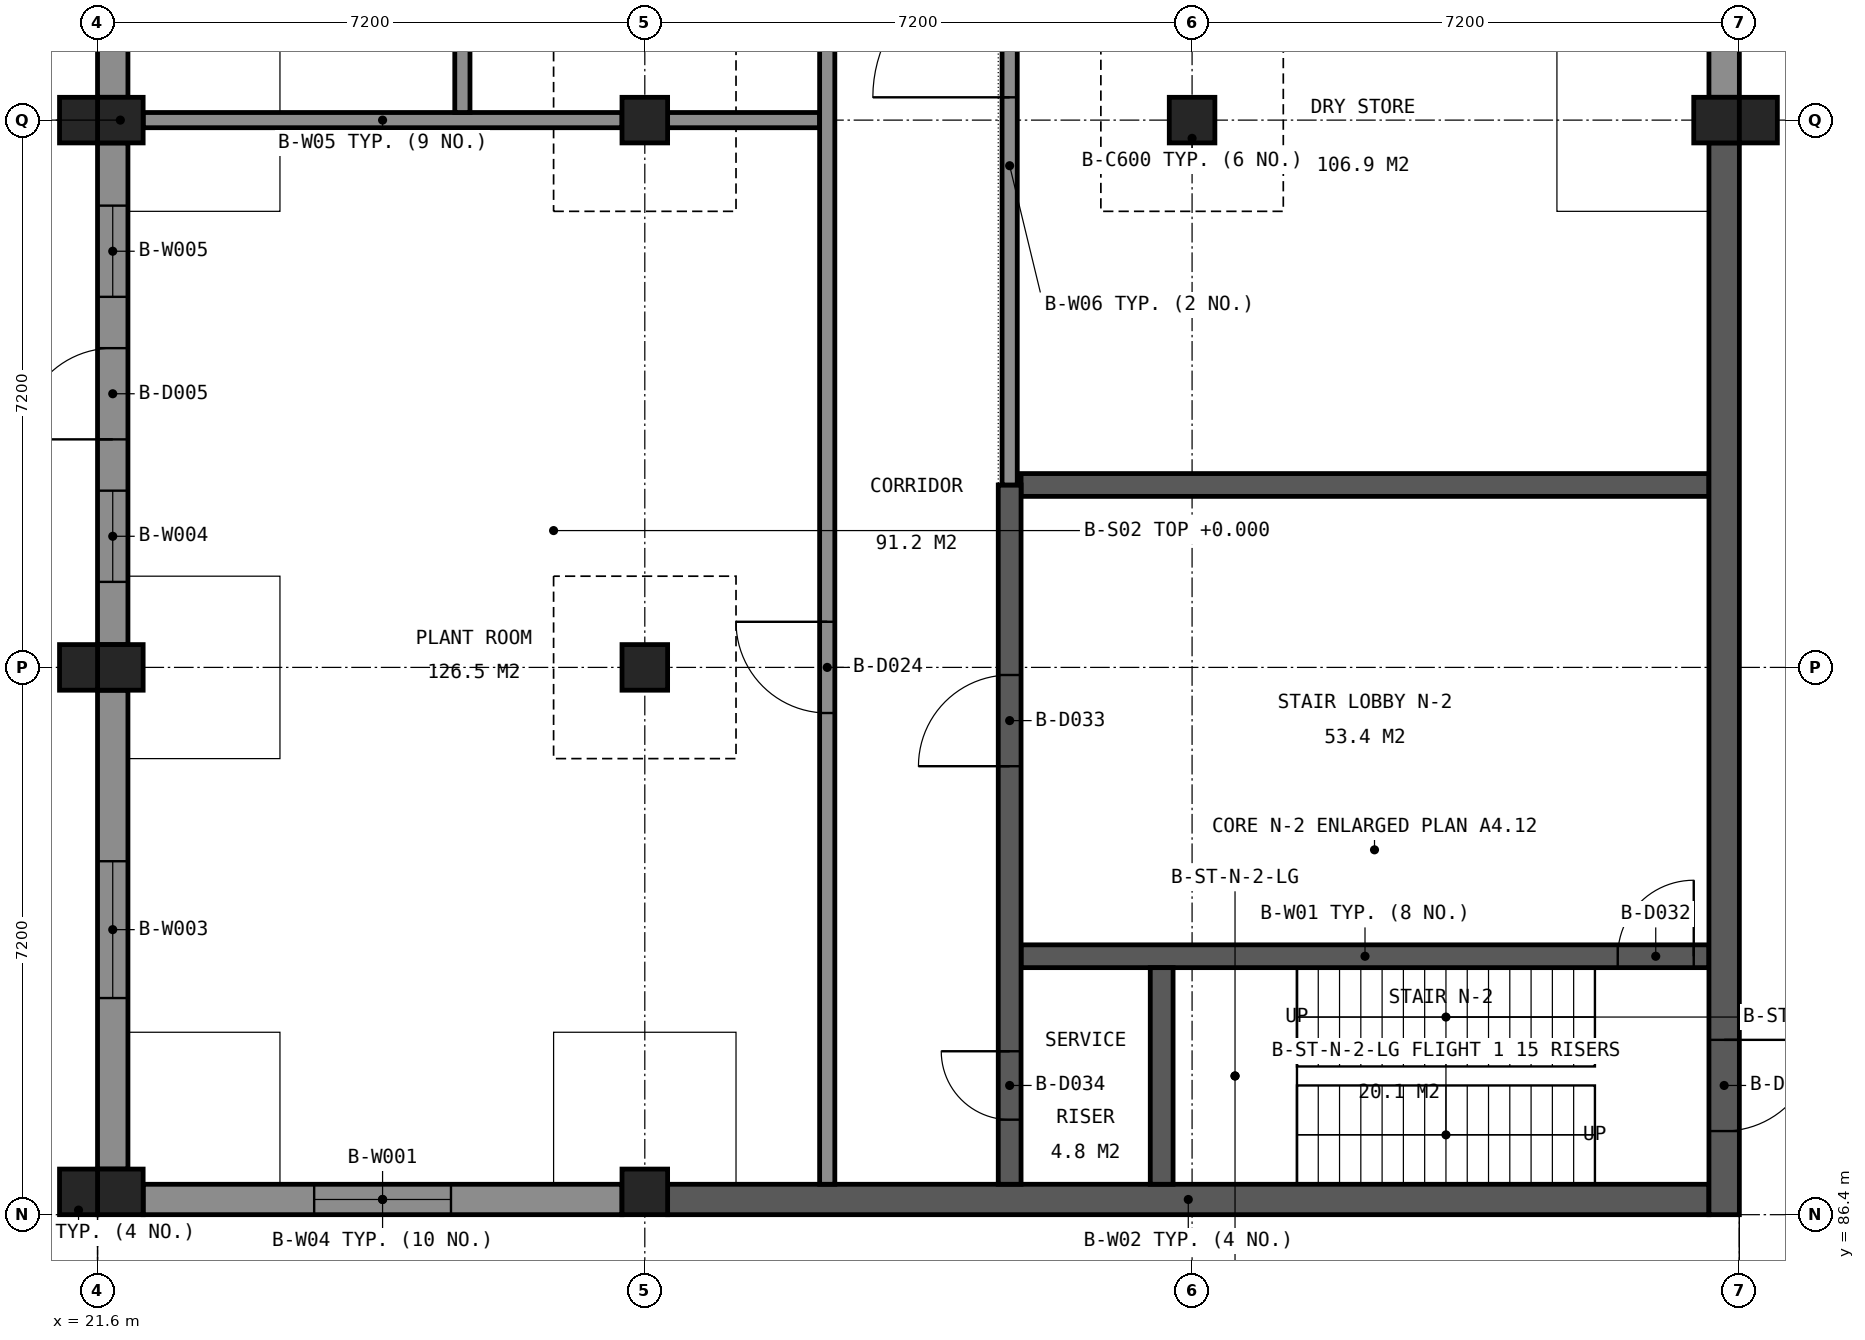
"""IFC4 building model, lengths in metres.
Left out: names, types, materials, properties, quantities, classifications, styles, units other than length and angle.
Written with IfcOpenShell. Run it as: python <this file> out.ifc"""

import sys

from ifc_helpers import new_model, si_unit, direction, frame, frame_2d, origin, origin_2d, place, context, subcontext, project, spatial, rectangle, extrude, element, fill, save


model = new_model("IFC4")
c1 = context("Model", 3, precision=1e-05, world=origin(), true_north=direction((0.0, 1.0)))
c2 = subcontext(c1, "Body", "Model", "MODEL_VIEW")
j1 = project(units=[si_unit("LENGTHUNIT", "METRE"), si_unit("PLANEANGLEUNIT", "RADIAN")], contexts=[c1])
p1 = place(None, origin())
s1 = spatial("IfcSite", under=j1, at=p1, CompositionType="ELEMENT")
p2 = place(p1, origin())
s2 = spatial("IfcBuilding", under=s1, at=p2, CompositionType="ELEMENT")
p3 = place(p2, origin())
s3 = spatial("IfcBuildingStorey", under=s2, at=p3, CompositionType="ELEMENT", Elevation=0.0)
for number, where, z_axis, x_axis in (
    (1, (21.9, 100.8, 0.0), (0.0, 0.0, 1.0), (1.0, 0.0, 0.0)),
    (2, (21.9, 93.6, 0.0), (0.0, 0.0, 1.0), (1.0, 0.0, 0.0)),
    (3, (21.9, 86.7, 0.0), (0.0, 0.0, 1.0), (1.0, 0.0, 0.0)),
    (4, (28.8, 100.8, 0.0), (0.0, 0.0, 1.0), (1.0, 0.0, 0.0)),
    (5, (28.8, 93.6, 0.0), (0.0, 0.0, 1.0), (1.0, 0.0, 0.0)),
    (6, (28.8, 86.7, 0.0), (0.0, 0.0, 1.0), (1.0, 0.0, 0.0)),
    (7, (36.0, 100.8, 0.0), (0.0, 0.0, 1.0), (1.0, 0.0, 0.0)),
    (8, (42.9, 100.8, 0.0), (0.0, 0.0, 1.0), (1.0, 0.0, 0.0)),
):
    element("IfcColumn", number, at=place(p3, frame(where, z_axis=z_axis, x_axis=x_axis)), inside=s3, PredefinedType="COLUMN", context=c2, shape_type="SweptSolid", body=[
        extrude(rectangle(XDim=0.6, YDim=0.6, at=origin_2d()), origin(), (0.0, 0.0, 1.0), 4.8),
    ])
p4 = place(p3, frame((29.1, 86.6, 0.0), z_axis=(0.0, 0.0, 1.0), x_axis=(1.0, 0.0, 0.0)))
e9 = element("IfcWall", 9, at=p4, inside=s3, PredefinedType="SHEAR", context=c2, shape_type="SweptSolid", body=[
    extrude(rectangle(XDim=13.7, YDim=0.4, at=frame_2d((6.85, 0.0))), origin(), (0.0, 0.0, 1.0), 4.55),
])
p5 = place(p3, frame((33.75, 89.8, 0.0), z_axis=(0.0, 0.0, 1.0), x_axis=(1.0, 0.0, 0.0)))
e10 = element("IfcWall", 10, at=p5, inside=s3, PredefinedType="SHEAR", context=c2, shape_type="SweptSolid", body=[
    extrude(rectangle(XDim=9.05, YDim=0.3, at=frame_2d((4.525, 0.0))), origin(), (0.0, 0.0, 1.0), 4.55),
])
p6 = place(p5, frame((7.85, 0.0, 0.0)))
e11 = element("IfcOpeningElement", 11, at=p6, cuts=e10, PredefinedType="OPENING", context=c2, shape_type="SweptSolid", body=[
    extrude(rectangle(XDim=1.0, YDim=2.1, at=frame_2d((0.5, 1.05))), frame((0.0, 0.16, 0.0), z_axis=(0.0, -1.0, 0.0), x_axis=(1.0, 0.0, 0.0)), (0.0, 0.0, 1.0), 0.32),
])
p7 = place(p3, frame((33.75, 96.0, 0.0), z_axis=(0.0, 0.0, 1.0), x_axis=(1.0, 0.0, 0.0)))
e12 = element("IfcWall", 12, at=p7, inside=s3, PredefinedType="SHEAR", context=c2, shape_type="SweptSolid", body=[
    extrude(rectangle(XDim=9.05, YDim=0.3, at=frame_2d((4.525, 0.0))), origin(), (0.0, 0.0, 1.0), 4.55),
])
p8 = place(p3, frame((33.6, 86.8, 0.0), z_axis=(0.0, 0.0, 1.0), x_axis=(0.0, 1.0, 0.0)))
e13 = element("IfcWall", 13, at=p8, inside=s3, PredefinedType="SHEAR", context=c2, shape_type="SweptSolid", body=[
    extrude(rectangle(XDim=9.2, YDim=0.3, at=frame_2d((4.6, 0.0))), origin(), (0.0, 0.0, 1.0), 4.55),
])
p9 = place(p8, frame((5.5, 0.0, 0.0)))
e14 = element("IfcOpeningElement", 14, at=p9, cuts=e13, PredefinedType="OPENING", context=c2, shape_type="SweptSolid", body=[
    extrude(rectangle(XDim=1.2, YDim=2.1, at=frame_2d((0.6, 1.05))), frame((0.0, 0.16, 0.0), z_axis=(0.0, -1.0, 0.0), x_axis=(1.0, 0.0, 0.0)), (0.0, 0.0, 1.0), 0.32),
])
p10 = place(p8, frame((0.85, 0.0, 0.0)))
e15 = element("IfcOpeningElement", 15, at=p10, cuts=e13, PredefinedType="OPENING", context=c2, shape_type="SweptSolid", body=[
    extrude(rectangle(XDim=0.9, YDim=2.1, at=frame_2d((0.45, 1.05))), frame((0.0, 0.16, 0.0), z_axis=(0.0, -1.0, 0.0), x_axis=(1.0, 0.0, 0.0)), (0.0, 0.0, 1.0), 0.32),
])
p11 = place(p3, frame((35.6, 86.8, 0.0), z_axis=(0.0, 0.0, 1.0), x_axis=(0.0, 1.0, 0.0)))
e16 = element("IfcWall", 16, at=p11, inside=s3, PredefinedType="SHEAR", context=c2, shape_type="SweptSolid", body=[
    extrude(rectangle(XDim=2.85, YDim=0.3, at=frame_2d((1.425, 0.0))), origin(), (0.0, 0.0, 1.0), 4.55),
])
p12 = place(p3, frame((43.0, 86.4, 0.0), z_axis=(0.0, 0.0, 1.0), x_axis=(0.0, 1.0, 0.0)))
e17 = element("IfcWall", 17, at=p12, inside=s3, PredefinedType="SHEAR", context=c2, shape_type="SweptSolid", body=[
    extrude(rectangle(XDim=14.1, YDim=0.4, at=frame_2d((7.05, 0.0))), origin(), (0.0, 0.0, 1.0), 4.55),
])
p13 = place(p12, frame((2.3, 0.0, 0.0), z_axis=(0.0, 0.0, 1.0), x_axis=(-1.0, 0.0, 0.0)))
e18 = element("IfcOpeningElement", 18, at=p13, cuts=e17, PredefinedType="OPENING", context=c2, shape_type="SweptSolid", body=[
    extrude(rectangle(XDim=1.2, YDim=2.1, at=frame_2d((0.6, 1.05))), frame((0.0, 0.21, 0.0), z_axis=(0.0, -1.0, 0.0), x_axis=(1.0, 0.0, 0.0)), (0.0, 0.0, 1.0), 0.42),
])
p14 = place(p3, frame((22.2, 86.6, 0.0), z_axis=(0.0, 0.0, 1.0), x_axis=(1.0, 0.0, 0.0)))
e19 = element("IfcWall", 19, at=p14, inside=s3, PredefinedType="SOLIDWALL", context=c2, shape_type="SweptSolid", body=[
    extrude(rectangle(XDim=6.3, YDim=0.4, at=frame_2d((3.15, 0.0))), origin(), (0.0, 0.0, 1.0), 3.95),
])
p15 = place(p14, frame((2.25, 0.0, 2.0)))
e20 = element("IfcOpeningElement", 20, at=p15, cuts=e19, PredefinedType="OPENING", context=c2, shape_type="SweptSolid", body=[
    extrude(rectangle(XDim=1.8, YDim=1.5, at=frame_2d((0.9, 0.75))), frame((0.0, 0.21, 0.0), z_axis=(0.0, -1.0, 0.0), x_axis=(1.0, 0.0, 0.0)), (0.0, 0.0, 1.0), 0.42),
])
p16 = place(p3, frame((21.8, 87.0, 0.0), z_axis=(0.0, 0.0, 1.0), x_axis=(0.0, 1.0, 0.0)))
e21 = element("IfcWall", 21, at=p16, inside=s3, PredefinedType="SOLIDWALL", context=c2, shape_type="SweptSolid", body=[
    extrude(rectangle(XDim=6.3, YDim=0.4, at=frame_2d((3.15, 0.0))), origin(), (0.0, 0.0, 1.0), 3.95),
])
p17 = place(p16, frame((2.25, 0.0, 2.0)))
e22 = element("IfcOpeningElement", 22, at=p17, cuts=e21, PredefinedType="OPENING", context=c2, shape_type="SweptSolid", body=[
    extrude(rectangle(XDim=1.8, YDim=1.5, at=frame_2d((0.9, 0.75))), frame((0.0, 0.21, 0.0), z_axis=(0.0, -1.0, 0.0), x_axis=(1.0, 0.0, 0.0)), (0.0, 0.0, 1.0), 0.42),
])
p18 = place(p3, frame((21.8, 93.9, 0.0), z_axis=(0.0, 0.0, 1.0), x_axis=(0.0, 1.0, 0.0)))
e23 = element("IfcWall", 23, at=p18, inside=s3, PredefinedType="SOLIDWALL", context=c2, shape_type="SweptSolid", body=[
    extrude(rectangle(XDim=6.6, YDim=0.4, at=frame_2d((3.3, 0.0))), origin(), (0.0, 0.0, 1.0), 3.95),
])
p19 = place(p18, frame((2.7, 0.0, 0.0)))
e24 = element("IfcOpeningElement", 24, at=p19, cuts=e23, PredefinedType="OPENING", context=c2, shape_type="SweptSolid", body=[
    extrude(rectangle(XDim=1.2, YDim=2.1, at=frame_2d((0.6, 1.05))), frame((0.0, 0.21, 0.0), z_axis=(0.0, -1.0, 0.0), x_axis=(1.0, 0.0, 0.0)), (0.0, 0.0, 1.0), 0.42),
])
p20 = place(p18, frame((0.825, 0.0, 2.0)))
e25 = element("IfcOpeningElement", 25, at=p20, cuts=e23, PredefinedType="OPENING", context=c2, shape_type="SweptSolid", body=[
    extrude(rectangle(XDim=1.2, YDim=1.5, at=frame_2d((0.6, 0.75))), frame((0.0, 0.21, 0.0), z_axis=(0.0, -1.0, 0.0), x_axis=(1.0, 0.0, 0.0)), (0.0, 0.0, 1.0), 0.42),
])
p21 = place(p18, frame((4.575, 0.0, 2.0)))
e26 = element("IfcOpeningElement", 26, at=p21, cuts=e23, PredefinedType="OPENING", context=c2, shape_type="SweptSolid", body=[
    extrude(rectangle(XDim=1.2, YDim=1.5, at=frame_2d((0.6, 0.75))), frame((0.0, 0.21, 0.0), z_axis=(0.0, -1.0, 0.0), x_axis=(1.0, 0.0, 0.0)), (0.0, 0.0, 1.0), 0.42),
])
p22 = place(p3, frame((21.8, 101.1, 0.0), z_axis=(0.0, 0.0, 1.0), x_axis=(0.0, 1.0, 0.0)))
e27 = element("IfcWall", 27, at=p22, inside=s3, PredefinedType="SOLIDWALL", context=c2, shape_type="SweptSolid", body=[
    extrude(rectangle(XDim=6.6, YDim=0.4, at=frame_2d((3.3, 0.0))), origin(), (0.0, 0.0, 1.0), 3.95),
])
p23 = place(p22, frame((1.8, 0.0, 0.0)))
e28 = element("IfcOpeningElement", 28, at=p23, cuts=e27, PredefinedType="OPENING", context=c2, shape_type="SweptSolid", body=[
    extrude(rectangle(XDim=3.0, YDim=3.0, at=frame_2d((1.5, 1.5))), frame((0.0, 0.21, 0.0), z_axis=(0.0, -1.0, 0.0), x_axis=(1.0, 0.0, 0.0)), (0.0, 0.0, 1.0), 0.42),
])
p24 = place(p3, frame((43.0, 101.1, 0.0), z_axis=(0.0, 0.0, 1.0), x_axis=(0.0, 1.0, 0.0)))
e29 = element("IfcWall", 29, at=p24, inside=s3, PredefinedType="SOLIDWALL", context=c2, shape_type="SweptSolid", body=[
    extrude(rectangle(XDim=6.6, YDim=0.4, at=frame_2d((3.3, 0.0))), origin(), (0.0, 0.0, 1.0), 3.95),
])
p25 = place(p24, frame((2.4, 0.0, 2.0)))
e30 = element("IfcOpeningElement", 30, at=p25, cuts=e29, PredefinedType="OPENING", context=c2, shape_type="SweptSolid", body=[
    extrude(rectangle(XDim=1.8, YDim=1.5, at=frame_2d((0.9, 0.75))), frame((0.0, 0.21, 0.0), z_axis=(0.0, -1.0, 0.0), x_axis=(1.0, 0.0, 0.0)), (0.0, 0.0, 1.0), 0.42),
])
for number, where, z_axis, x_axis in (
    (31, (21.35, 86.7, -0.25), (0.0, 0.0, 1.0), (1.0, 0.0, 0.0)),
    (32, (21.35, 93.6, -0.25), (0.0, 0.0, 1.0), (1.0, 0.0, 0.0)),
    (33, (21.35, 100.8, -0.25), (0.0, 0.0, 1.0), (1.0, 0.0, 0.0)),
    (34, (43.45, 100.8, -0.25), (0.0, 0.0, 1.0), (1.0, 0.0, 0.0)),
):
    element("IfcColumn", number, at=place(p3, frame(where, z_axis=z_axis, x_axis=x_axis)), inside=s3, PredefinedType="COLUMN", context=c2, shape_type="SweptSolid", body=[
        extrude(rectangle(XDim=0.5, YDim=0.6, at=origin_2d()), origin(), (0.0, 0.0, 1.0), 5.05),
    ])
p26 = place(p3, frame((22.2, 100.8, 0.0), z_axis=(0.0, 0.0, 1.0), x_axis=(1.0, 0.0, 0.0)))
e35 = element("IfcWall", 35, at=p26, inside=s3, PredefinedType="PARTITIONING", context=c2, shape_type="SweptSolid", body=[
    extrude(rectangle(XDim=6.3, YDim=0.2, at=frame_2d((3.15, 0.0))), origin(), (0.0, 0.0, 1.0), 3.95),
])
p27 = place(p3, frame((29.1, 100.8, 0.0), z_axis=(0.0, 0.0, 1.0), x_axis=(1.0, 0.0, 0.0)))
e36 = element("IfcWall", 36, at=p27, inside=s3, PredefinedType="PARTITIONING", context=c2, shape_type="SweptSolid", body=[
    extrude(rectangle(XDim=2.0, YDim=0.2, at=frame_2d((1.0, 0.0))), origin(), (0.0, 0.0, 1.0), 3.95),
])
p28 = place(p3, frame((26.4, 100.9, 0.0), z_axis=(0.0, 0.0, 1.0), x_axis=(0.0, 1.0, 0.0)))
e37 = element("IfcWall", 37, at=p28, inside=s3, PredefinedType="PARTITIONING", context=c2, shape_type="SweptSolid", body=[
    extrude(rectangle(XDim=21.4, YDim=0.2, at=frame_2d((10.7, 0.0))), origin(), (0.0, 0.0, 1.0), 3.95),
])
p29 = place(p28, frame((17.3, 0.0, 0.0)))
e38 = element("IfcOpeningElement", 38, at=p29, cuts=e37, PredefinedType="OPENING", context=c2, shape_type="SweptSolid", body=[
    extrude(rectangle(XDim=1.2, YDim=2.1, at=frame_2d((0.6, 1.05))), frame((0.0, 0.11, 0.0), z_axis=(0.0, -1.0, 0.0), x_axis=(1.0, 0.0, 0.0)), (0.0, 0.0, 1.0), 0.22),
])
p30 = place(p28, frame((10.1, 0.0, 0.0)))
e39 = element("IfcOpeningElement", 39, at=p30, cuts=e37, PredefinedType="OPENING", context=c2, shape_type="SweptSolid", body=[
    extrude(rectangle(XDim=1.2, YDim=2.1, at=frame_2d((0.6, 1.05))), frame((0.0, 0.11, 0.0), z_axis=(0.0, -1.0, 0.0), x_axis=(1.0, 0.0, 0.0)), (0.0, 0.0, 1.0), 0.22),
])
p31 = place(p28, frame((2.9, 0.0, 0.0)))
e40 = element("IfcOpeningElement", 40, at=p31, cuts=e37, PredefinedType="OPENING", context=c2, shape_type="SweptSolid", body=[
    extrude(rectangle(XDim=1.2, YDim=2.1, at=frame_2d((0.6, 1.05))), frame((0.0, 0.11, 0.0), z_axis=(0.0, -1.0, 0.0), x_axis=(1.0, 0.0, 0.0)), (0.0, 0.0, 1.0), 0.22),
])
p32 = place(p3, frame((31.2, 86.8, 0.0), z_axis=(0.0, 0.0, 1.0), x_axis=(0.0, 1.0, 0.0)))
e41 = element("IfcWall", 41, at=p32, inside=s3, PredefinedType="PARTITIONING", context=c2, shape_type="SweptSolid", body=[
    extrude(rectangle(XDim=42.4, YDim=0.2, at=frame_2d((21.2, 0.0))), origin(), (0.0, 0.0, 1.0), 3.95),
])
p33 = place(p32, frame((38.7, 0.0, 0.0)))
e42 = element("IfcOpeningElement", 42, at=p33, cuts=e41, PredefinedType="OPENING", context=c2, shape_type="SweptSolid", body=[
    extrude(rectangle(XDim=1.0, YDim=2.1, at=frame_2d((0.5, 1.05))), frame((0.0, 0.11, 0.0), z_axis=(0.0, -1.0, 0.0), x_axis=(1.0, 0.0, 0.0)), (0.0, 0.0, 1.0), 0.22),
])
p34 = place(p32, frame((23.9, 0.0, 0.0)))
e43 = element("IfcOpeningElement", 43, at=p34, cuts=e41, PredefinedType="OPENING", context=c2, shape_type="SweptSolid", body=[
    extrude(rectangle(XDim=1.8, YDim=2.1, at=frame_2d((0.9, 1.05))), frame((0.0, 0.11, 0.0), z_axis=(0.0, -1.0, 0.0), x_axis=(1.0, 0.0, 0.0)), (0.0, 0.0, 1.0), 0.22),
])
p35 = place(p32, frame((6.2, 0.0, 0.0)))
e44 = element("IfcOpeningElement", 44, at=p35, cuts=e41, PredefinedType="OPENING", context=c2, shape_type="SweptSolid", body=[
    extrude(rectangle(XDim=1.2, YDim=2.1, at=frame_2d((0.6, 1.05))), frame((0.0, 0.11, 0.0), z_axis=(0.0, -1.0, 0.0), x_axis=(1.0, 0.0, 0.0)), (0.0, 0.0, 1.0), 0.22),
])
p36 = place(p3, frame((33.6, 96.0, 0.0), z_axis=(0.0, 0.0, 1.0), x_axis=(0.0, 1.0, 0.0)))
e45 = element("IfcWall", 45, at=p36, inside=s3, PredefinedType="PARTITIONING", context=c2, shape_type="SweptSolid", body=[
    extrude(rectangle(XDim=24.0, YDim=0.2, at=frame_2d((12.0, 0.0))), origin(), (0.0, 0.0, 1.0), 3.95),
])
p37 = place(p36, frame((17.1, 0.0, 0.0)))
e46 = element("IfcOpeningElement", 46, at=p37, cuts=e45, PredefinedType="OPENING", context=c2, shape_type="SweptSolid", body=[
    extrude(rectangle(XDim=1.8, YDim=2.1, at=frame_2d((0.9, 1.05))), frame((0.0, 0.11, 0.0), z_axis=(0.0, -1.0, 0.0), x_axis=(1.0, 0.0, 0.0)), (0.0, 0.0, 1.0), 0.22),
])
p38 = place(p36, frame((5.1, 0.0, 0.0)))
e47 = element("IfcOpeningElement", 47, at=p38, cuts=e45, PredefinedType="OPENING", context=c2, shape_type="SweptSolid", body=[
    extrude(rectangle(XDim=1.8, YDim=2.1, at=frame_2d((0.9, 1.05))), frame((0.0, 0.11, 0.0), z_axis=(0.0, -1.0, 0.0), x_axis=(1.0, 0.0, 0.0)), (0.0, 0.0, 1.0), 0.22),
])
p39 = place(p19, origin())
e48 = element("IfcDoor", 48, at=p39, inside=s3, OperationType="SINGLE_SWING_LEFT", PredefinedType="DOOR", context=c2, shape_type="SweptSolid", body=[
    extrude(rectangle(XDim=1.2, YDim=2.1, at=frame_2d((0.6, 1.05))), frame((0.0, 0.025, 0.0), z_axis=(0.0, -1.0, 0.0), x_axis=(1.0, 0.0, 0.0)), (0.0, 0.0, 1.0), 0.05),
])
fill(e24, e48)
p40 = place(p13, origin())
e49 = element("IfcDoor", 49, at=p40, inside=s3, OperationType="SINGLE_SWING_LEFT", PredefinedType="DOOR", context=c2, shape_type="SweptSolid", body=[
    extrude(rectangle(XDim=1.2, YDim=2.1, at=frame_2d((0.6, 1.05))), frame((0.0, 0.025, 0.0), z_axis=(0.0, -1.0, 0.0), x_axis=(1.0, 0.0, 0.0)), (0.0, 0.0, 1.0), 0.05),
])
fill(e18, e49)
p41 = place(p15, origin())
e50 = element("IfcWindow", 50, at=p41, inside=s3, PartitioningType="SINGLE_PANEL", PredefinedType="WINDOW", context=c2, shape_type="SweptSolid", body=[
    extrude(rectangle(XDim=1.8, YDim=1.5, at=frame_2d((0.9, 0.75))), frame((0.0, 0.03, 0.0), z_axis=(0.0, -1.0, 0.0), x_axis=(1.0, 0.0, 0.0)), (0.0, 0.0, 1.0), 0.06),
])
fill(e20, e50)
p42 = place(p17, origin())
e51 = element("IfcWindow", 51, at=p42, inside=s3, PartitioningType="SINGLE_PANEL", PredefinedType="WINDOW", context=c2, shape_type="SweptSolid", body=[
    extrude(rectangle(XDim=1.8, YDim=1.5, at=frame_2d((0.9, 0.75))), frame((0.0, 0.03, 0.0), z_axis=(0.0, -1.0, 0.0), x_axis=(1.0, 0.0, 0.0)), (0.0, 0.0, 1.0), 0.06),
])
fill(e22, e51)
p43 = place(p20, origin())
e52 = element("IfcWindow", 52, at=p43, inside=s3, PartitioningType="SINGLE_PANEL", PredefinedType="WINDOW", context=c2, shape_type="SweptSolid", body=[
    extrude(rectangle(XDim=1.2, YDim=1.5, at=frame_2d((0.6, 0.75))), frame((0.0, 0.03, 0.0), z_axis=(0.0, -1.0, 0.0), x_axis=(1.0, 0.0, 0.0)), (0.0, 0.0, 1.0), 0.06),
])
fill(e25, e52)
p44 = place(p21, origin())
e53 = element("IfcWindow", 53, at=p44, inside=s3, PartitioningType="SINGLE_PANEL", PredefinedType="WINDOW", context=c2, shape_type="SweptSolid", body=[
    extrude(rectangle(XDim=1.2, YDim=1.5, at=frame_2d((0.6, 0.75))), frame((0.0, 0.03, 0.0), z_axis=(0.0, -1.0, 0.0), x_axis=(1.0, 0.0, 0.0)), (0.0, 0.0, 1.0), 0.06),
])
fill(e26, e53)
p45 = place(p35, origin())
e54 = element("IfcDoor", 54, at=p45, inside=s3, OperationType="SINGLE_SWING_RIGHT", PredefinedType="DOOR", context=c2, shape_type="SweptSolid", body=[
    extrude(rectangle(XDim=1.2, YDim=2.1, at=frame_2d((0.6, 1.05))), frame((0.0, 0.025, 0.0), z_axis=(0.0, -1.0, 0.0), x_axis=(1.0, 0.0, 0.0)), (0.0, 0.0, 1.0), 0.05),
])
fill(e44, e54)
p46 = place(p38, origin())
e55 = element("IfcDoor", 55, at=p46, inside=s3, OperationType="DOUBLE_DOOR_DOUBLE_SWING", PredefinedType="DOOR", context=c2, shape_type="SweptSolid", body=[
    extrude(rectangle(XDim=1.8, YDim=2.1, at=frame_2d((0.9, 1.05))), frame((0.0, 0.025, 0.0), z_axis=(0.0, -1.0, 0.0), x_axis=(1.0, 0.0, 0.0)), (0.0, 0.0, 1.0), 0.05),
])
fill(e47, e55)
p47 = place(p6, origin())
e56 = element("IfcDoor", 56, at=p47, inside=s3, OperationType="SINGLE_SWING_RIGHT", PredefinedType="DOOR", context=c2, shape_type="SweptSolid", body=[
    extrude(rectangle(XDim=1.0, YDim=2.1, at=frame_2d((0.5, 1.05))), frame((0.0, 0.025, 0.0), z_axis=(0.0, -1.0, 0.0), x_axis=(1.0, 0.0, 0.0)), (0.0, 0.0, 1.0), 0.05),
])
fill(e11, e56)
p48 = place(p9, origin())
e57 = element("IfcDoor", 57, at=p48, inside=s3, OperationType="SINGLE_SWING_LEFT", PredefinedType="DOOR", context=c2, shape_type="SweptSolid", body=[
    extrude(rectangle(XDim=1.2, YDim=2.1, at=frame_2d((0.6, 1.05))), frame((0.0, 0.025, 0.0), z_axis=(0.0, -1.0, 0.0), x_axis=(1.0, 0.0, 0.0)), (0.0, 0.0, 1.0), 0.05),
])
fill(e14, e57)
p49 = place(p10, origin())
e58 = element("IfcDoor", 58, at=p49, inside=s3, OperationType="SINGLE_SWING_RIGHT", PredefinedType="DOOR", context=c2, shape_type="SweptSolid", body=[
    extrude(rectangle(XDim=0.9, YDim=2.1, at=frame_2d((0.45, 1.05))), frame((0.0, 0.025, 0.0), z_axis=(0.0, -1.0, 0.0), x_axis=(1.0, 0.0, 0.0)), (0.0, 0.0, 1.0), 0.05),
])
fill(e15, e58)
save(model, sys.argv[1])
